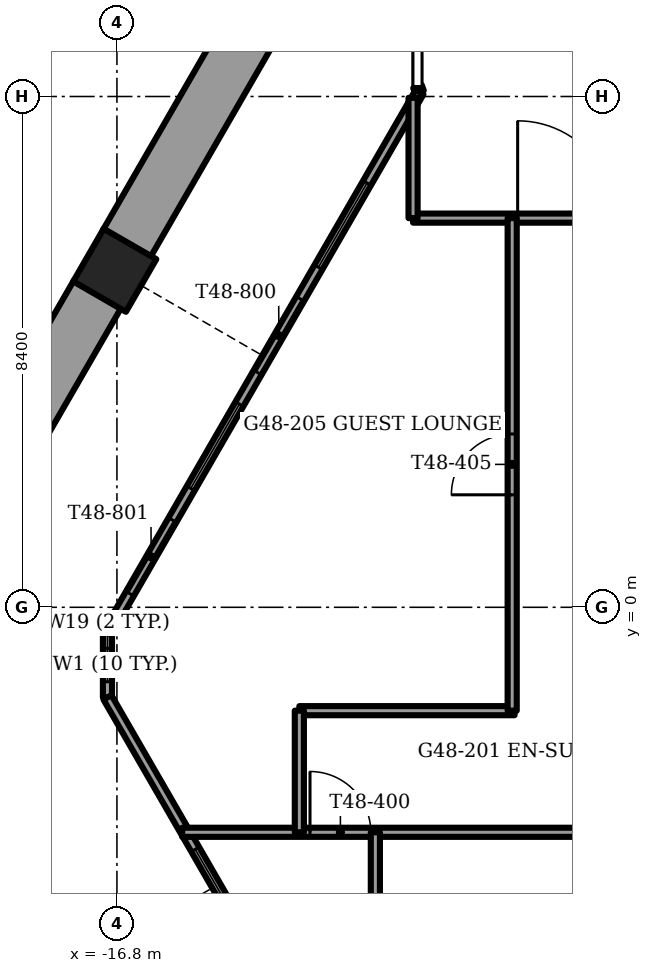
"""IFC4 building model, lengths in metres.
Left out: names, types, materials, properties, quantities, classifications, styles, units other than length and angle.
Written with IfcOpenShell. Run it as: python <this file> out.ifc"""

import sys

from ifc_helpers import new_model, si_unit, direction, frame, frame_2d, origin, origin_2d, place, context, subcontext, project, spatial, rectangle, extrude, element, fill, save


model = new_model("IFC4")
c1 = context("Model", 3, precision=1e-05, world=origin(), true_north=direction((0.0, 1.0)))
c2 = subcontext(c1, "Body", "Model", "MODEL_VIEW")
j1 = project(units=[si_unit("LENGTHUNIT", "METRE"), si_unit("PLANEANGLEUNIT", "RADIAN")], contexts=[c1])
p1 = place(None, origin())
s1 = spatial("IfcSite", under=j1, at=p1, CompositionType="ELEMENT")
p2 = place(p1, origin())
s2 = spatial("IfcBuilding", under=s1, at=p2, CompositionType="ELEMENT")
p3 = place(p2, frame((0.0, 0.0, 194.5)))
s3 = spatial("IfcBuildingStorey", under=s2, at=p3, CompositionType="ELEMENT", Elevation=194.5)
p4 = place(p3, frame((-16.835, 5.542, -1.2), z_axis=(0.0, 0.0, 1.0), x_axis=(0.5, 0.866025403784, 0.0)))
e1 = element("IfcColumn", 1, at=p4, inside=s3, PredefinedType="COLUMN", context=c2, shape_type="SweptSolid", body=[
    extrude(rectangle(XDim=1.0, YDim=1.0, at=origin_2d()), origin(), (0.0, 0.0, 1.0), 3.75),
])
p5 = place(p3, frame((-13.496, 11.427, 0.0), z_axis=(0.0, 0.0, 1.0), x_axis=(-0.499984268907, -0.866034485945, 0.0)))
e2 = element("IfcWall", 2, at=p5, inside=s3, PredefinedType="PARAPET", context=c2, shape_type="SweptSolid", body=[
    extrude(rectangle(XDim=6.296, YDim=0.9, at=frame_2d((3.148, 0.0))), origin(), (0.0, 0.0, 1.0), 1.1),
])
p6 = place(p3, frame((-17.114, 5.16, 0.0), z_axis=(0.0, 0.0, 1.0), x_axis=(-0.500022104698, -0.866012641255, 0.0)))
e3 = element("IfcWall", 3, at=p6, inside=s3, PredefinedType="PARAPET", context=c2, shape_type="SweptSolid", body=[
    extrude(rectangle(XDim=6.512, YDim=0.9, at=frame_2d((3.256, 0.0))), origin(), (0.0, 0.0, 1.0), 1.1),
])
p7 = place(p3, frame((-20.37, -1.419, 0.0), z_axis=(0.0, 0.0, 1.0), x_axis=(0.500033586455, -0.866006011767, 0.0)))
e4 = element("IfcWall", 4, at=p7, inside=s3, PredefinedType="PARAPET", context=c2, shape_type="SweptSolid", body=[
    extrude(rectangle(XDim=4.868, YDim=0.9, at=frame_2d((2.434, 0.0))), origin(), (0.0, 0.0, 1.0), 1.1),
])
p8 = place(p3, frame((-11.824, 8.472, 0.0), z_axis=(0.0, 0.0, 1.0), x_axis=(-0.499996992154, -0.866027140358, 0.0)))
e5 = element("IfcWall", 5, at=p8, inside=s3, PredefinedType="SOLIDWALL", context=c2, shape_type="SweptSolid", body=[
    extrude(rectangle(XDim=10.264, YDim=0.15, at=frame_2d((5.132, 0.0))), origin(), (0.0, 0.0, 1.0), 3.45),
])
p9 = place(p8, frame((1.725, 0.0, 0.15)))
e6 = element("IfcOpeningElement", 6, at=p9, cuts=e5, PredefinedType="OPENING", context=c2, shape_type="SweptSolid", body=[
    extrude(rectangle(XDim=1.6, YDim=2.2, at=frame_2d((0.8, 1.1))), frame((0.0, 0.075, 0.0), z_axis=(0.0, -1.0, 0.0), x_axis=(1.0, 0.0, 0.0)), (0.0, 0.0, 1.0), 0.15),
])
p10 = place(p8, frame((3.925, 0.0, 0.0)))
e7 = element("IfcOpeningElement", 7, at=p10, cuts=e5, PredefinedType="OPENING", context=c2, shape_type="SweptSolid", body=[
    extrude(rectangle(XDim=1.4, YDim=2.4, at=frame_2d((0.7, 1.2))), frame((0.0, 0.075, 0.0), z_axis=(0.0, -1.0, 0.0), x_axis=(1.0, 0.0, 0.0)), (0.0, 0.0, 1.0), 0.15),
])
p11 = place(p8, frame((5.925, 0.0, 0.15)))
e8 = element("IfcOpeningElement", 8, at=p11, cuts=e5, PredefinedType="OPENING", context=c2, shape_type="SweptSolid", body=[
    extrude(rectangle(XDim=1.6, YDim=2.2, at=frame_2d((0.8, 1.1))), frame((0.0, 0.075, 0.0), z_axis=(0.0, -1.0, 0.0), x_axis=(1.0, 0.0, 0.0)), (0.0, 0.0, 1.0), 0.15),
])
p12 = place(p8, frame((8.125, 0.0, 0.0)))
e9 = element("IfcOpeningElement", 9, at=p12, cuts=e5, PredefinedType="OPENING", context=c2, shape_type="SweptSolid", body=[
    extrude(rectangle(XDim=1.4, YDim=2.4, at=frame_2d((0.7, 1.2))), frame((0.0, 0.075, 0.0), z_axis=(0.0, -1.0, 0.0), x_axis=(1.0, 0.0, 0.0)), (0.0, 0.0, 1.0), 0.15),
])
p13 = place(p3, frame((-16.956, -1.482, 0.0), z_axis=(0.0, 0.0, 1.0), x_axis=(0.499996992154, -0.866027140358, 0.0)))
e10 = element("IfcWall", 10, at=p13, inside=s3, PredefinedType="SOLIDWALL", context=c2, shape_type="SweptSolid", body=[
    extrude(rectangle(XDim=10.264, YDim=0.15, at=frame_2d((5.132, 0.0))), origin(), (0.0, 0.0, 1.0), 3.45),
])
p14 = place(p13, frame((2.885, 0.0, 0.15)))
e11 = element("IfcOpeningElement", 11, at=p14, cuts=e10, PredefinedType="OPENING", context=c2, shape_type="SweptSolid", body=[
    extrude(rectangle(XDim=1.6, YDim=2.2, at=frame_2d((0.8, 1.1))), frame((0.0, 0.075, 0.0), z_axis=(0.0, -1.0, 0.0), x_axis=(1.0, 0.0, 0.0)), (0.0, 0.0, 1.0), 0.15),
])
p15 = place(p13, frame((5.395, 0.0, 0.15)))
e12 = element("IfcOpeningElement", 12, at=p15, cuts=e10, PredefinedType="OPENING", context=c2, shape_type="SweptSolid", body=[
    extrude(rectangle(XDim=0.9, YDim=2.2, at=frame_2d((0.45, 1.1))), frame((0.0, 0.075, 0.0), z_axis=(0.0, -1.0, 0.0), x_axis=(1.0, 0.0, 0.0)), (0.0, 0.0, 1.0), 0.15),
])
p16 = place(p13, frame((6.73, 0.0, 0.0)))
e13 = element("IfcOpeningElement", 13, at=p16, cuts=e10, PredefinedType="OPENING", context=c2, shape_type="SweptSolid", body=[
    extrude(rectangle(XDim=1.4, YDim=2.4, at=frame_2d((0.7, 1.2))), frame((0.0, 0.075, 0.0), z_axis=(0.0, -1.0, 0.0), x_axis=(1.0, 0.0, 0.0)), (0.0, 0.0, 1.0), 0.15),
])
p17 = place(p3, frame((-16.956, -0.417, 0.0), z_axis=(0.0, 0.0, 1.0), x_axis=(0.0, -1.0, 0.0)))
e14 = element("IfcWall", 14, at=p17, inside=s3, PredefinedType="SOLIDWALL", context=c2, shape_type="SweptSolid", body=[
    extrude(rectangle(XDim=1.065, YDim=0.15, at=frame_2d((0.532, 0.0))), origin(), (0.0, 0.0, 1.0), 3.45),
])
p18 = place(p17, frame((0.258, 0.0, 0.15)))
e15 = element("IfcOpeningElement", 15, at=p18, cuts=e14, PredefinedType="OPENING", context=c2, shape_type="SweptSolid", body=[
    extrude(rectangle(XDim=0.55, YDim=2.2, at=frame_2d((0.275, 1.1))), frame((0.0, 0.075, 0.0), z_axis=(0.0, -1.0, 0.0), x_axis=(1.0, 0.0, 0.0)), (0.0, 0.0, 1.0), 0.15),
])
p19 = place(p3, frame((-11.824, 8.472, 0.0), z_axis=(0.0, 0.0, 1.0), x_axis=(-0.337751931921, 0.941235163221, 0.0)))
e16 = element("IfcWall", 16, at=p19, inside=s3, PredefinedType="SOLIDWALL", context=c2, shape_type="SweptSolid", body=[
    extrude(rectangle(XDim=0.098, YDim=0.15, at=frame_2d((0.049, 0.0))), origin(), (0.0, 0.0, 1.0), 3.45),
])
p20 = place(p3, frame((-15.727, -3.7, 0.0), z_axis=(0.0, 0.0, 1.0), x_axis=(1.0, 0.0, 0.0)))
e17 = element("IfcWall", 17, at=p20, inside=s3, PredefinedType="PARTITIONING", context=c2, shape_type="SweptSolid", body=[
    extrude(rectangle(XDim=6.567, YDim=0.15, at=frame_2d((3.284, 0.0))), origin(), (0.0, 0.0, 1.0), 3.45),
])
p21 = place(p20, frame((2.102, 0.0, 0.0)))
e18 = element("IfcOpeningElement", 18, at=p21, cuts=e17, PredefinedType="OPENING", context=c2, shape_type="SweptSolid", body=[
    extrude(rectangle(XDim=1.0, YDim=2.1, at=frame_2d((0.5, 1.05))), frame((0.0, 0.075, 0.0), z_axis=(0.0, -1.0, 0.0), x_axis=(1.0, 0.0, 0.0)), (0.0, 0.0, 1.0), 0.15),
])
p22 = place(p3, frame((-13.8, -1.7, 0.0), z_axis=(0.0, 0.0, 1.0), x_axis=(1.0, 0.0, 0.0)))
e19 = element("IfcWall", 19, at=p22, inside=s3, PredefinedType="PARTITIONING", context=c2, shape_type="SweptSolid", body=[
    extrude(rectangle(XDim=3.54, YDim=0.15, at=frame_2d((1.77, 0.0))), origin(), (0.0, 0.0, 1.0), 3.45),
])
p23 = place(p3, frame((-11.93, 6.4, 0.0), z_axis=(0.0, 0.0, 1.0), x_axis=(1.0, 0.0, 0.0)))
e20 = element("IfcWall", 20, at=p23, inside=s3, PredefinedType="PARTITIONING", context=c2, shape_type="SweptSolid", body=[
    extrude(rectangle(XDim=3.42, YDim=0.15, at=frame_2d((1.71, 0.0))), origin(), (0.0, 0.0, 1.0), 3.45),
])
p24 = place(p23, frame((1.72, 0.0, 0.0)))
e21 = element("IfcOpeningElement", 21, at=p24, cuts=e20, PredefinedType="OPENING", context=c2, shape_type="SweptSolid", body=[
    extrude(rectangle(XDim=1.6, YDim=2.1, at=frame_2d((0.8, 1.05))), frame((0.0, 0.075, 0.0), z_axis=(0.0, -1.0, 0.0), x_axis=(1.0, 0.0, 0.0)), (0.0, 0.0, 1.0), 0.15),
])
p25 = place(p3, frame((-10.3, -1.7, 0.0), z_axis=(0.0, 0.0, 1.0), x_axis=(0.0, 1.0, 0.0)))
e22 = element("IfcWall", 22, at=p25, inside=s3, PredefinedType="PARTITIONING", context=c2, shape_type="SweptSolid", body=[
    extrude(rectangle(XDim=8.1, YDim=0.15, at=frame_2d((4.05, 0.0))), origin(), (0.0, 0.0, 1.0), 3.45),
])
p26 = place(p25, frame((3.55, 0.0, 0.0)))
e23 = element("IfcOpeningElement", 23, at=p26, cuts=e22, PredefinedType="OPENING", context=c2, shape_type="SweptSolid", body=[
    extrude(rectangle(XDim=1.0, YDim=2.1, at=frame_2d((0.5, 1.05))), frame((0.0, 0.075, 0.0), z_axis=(0.0, -1.0, 0.0), x_axis=(1.0, 0.0, 0.0)), (0.0, 0.0, 1.0), 0.15),
])
p27 = place(p3, frame((-11.93, 6.4, 0.0), z_axis=(0.0, 0.0, 1.0), x_axis=(0.0, 1.0, 0.0)))
e24 = element("IfcWall", 24, at=p27, inside=s3, PredefinedType="PARTITIONING", context=c2, shape_type="SweptSolid", body=[
    extrude(rectangle(XDim=1.978, YDim=0.15, at=frame_2d((0.989, 0.0))), origin(), (0.0, 0.0, 1.0), 3.45),
])
p28 = place(p3, frame((-12.55, -6.7, 0.0), z_axis=(0.0, 0.0, 1.0), x_axis=(0.0, 1.0, 0.0)))
e25 = element("IfcWall", 25, at=p28, inside=s3, PredefinedType="PARTITIONING", context=c2, shape_type="SweptSolid", body=[
    extrude(rectangle(XDim=3.0, YDim=0.15, at=frame_2d((1.5, 0.0))), origin(), (0.0, 0.0, 1.0), 3.45),
])
p29 = place(p28, frame((1.1, 0.0, 0.0)))
e26 = element("IfcOpeningElement", 26, at=p29, cuts=e25, PredefinedType="OPENING", context=c2, shape_type="SweptSolid", body=[
    extrude(rectangle(XDim=0.8, YDim=2.1, at=frame_2d((0.4, 1.05))), frame((0.0, 0.075, 0.0), z_axis=(0.0, -1.0, 0.0), x_axis=(1.0, 0.0, 0.0)), (0.0, 0.0, 1.0), 0.15),
])
p30 = place(p3, frame((-13.8, -3.7, 0.0), z_axis=(0.0, 0.0, 1.0), x_axis=(0.0, 1.0, 0.0)))
e27 = element("IfcWall", 27, at=p30, inside=s3, PredefinedType="PARTITIONING", context=c2, shape_type="SweptSolid", body=[
    extrude(rectangle(XDim=2.0, YDim=0.15, at=frame_2d((1.0, 0.0))), origin(), (0.0, 0.0, 1.0), 3.45),
])
p31 = place(p9, origin())
e28 = element("IfcWindow", 28, at=p31, inside=s3, PartitioningType="SINGLE_PANEL", PredefinedType="WINDOW", context=c2, shape_type="SweptSolid", body=[
    extrude(rectangle(XDim=1.6, YDim=2.2, at=frame_2d((0.8, 1.1))), frame((0.0, 0.03, 0.0), z_axis=(0.0, -1.0, 0.0), x_axis=(1.0, 0.0, 0.0)), (0.0, 0.0, 1.0), 0.06),
])
fill(e6, e28)
p32 = place(p10, origin())
e29 = element("IfcDoor", 29, at=p32, inside=s3, OperationType="SLIDING_TO_LEFT", PredefinedType="DOOR", context=c2, shape_type="SweptSolid", body=[
    extrude(rectangle(XDim=1.4, YDim=2.4, at=frame_2d((0.7, 1.2))), frame((0.0, 0.025, 0.0), z_axis=(0.0, -1.0, 0.0), x_axis=(1.0, 0.0, 0.0)), (0.0, 0.0, 1.0), 0.05),
])
fill(e7, e29)
p33 = place(p11, origin())
e30 = element("IfcWindow", 30, at=p33, inside=s3, PartitioningType="SINGLE_PANEL", PredefinedType="WINDOW", context=c2, shape_type="SweptSolid", body=[
    extrude(rectangle(XDim=1.6, YDim=2.2, at=frame_2d((0.8, 1.1))), frame((0.0, 0.03, 0.0), z_axis=(0.0, -1.0, 0.0), x_axis=(1.0, 0.0, 0.0)), (0.0, 0.0, 1.0), 0.06),
])
fill(e8, e30)
p34 = place(p12, origin())
e31 = element("IfcDoor", 31, at=p34, inside=s3, OperationType="SLIDING_TO_RIGHT", PredefinedType="DOOR", context=c2, shape_type="SweptSolid", body=[
    extrude(rectangle(XDim=1.4, YDim=2.4, at=frame_2d((0.7, 1.2))), frame((0.0, 0.025, 0.0), z_axis=(0.0, -1.0, 0.0), x_axis=(1.0, 0.0, 0.0)), (0.0, 0.0, 1.0), 0.05),
])
fill(e9, e31)
p35 = place(p14, origin())
e32 = element("IfcWindow", 32, at=p35, inside=s3, PartitioningType="SINGLE_PANEL", PredefinedType="WINDOW", context=c2, shape_type="SweptSolid", body=[
    extrude(rectangle(XDim=1.6, YDim=2.2, at=frame_2d((0.8, 1.1))), frame((0.0, 0.03, 0.0), z_axis=(0.0, -1.0, 0.0), x_axis=(1.0, 0.0, 0.0)), (0.0, 0.0, 1.0), 0.06),
])
fill(e11, e32)
p36 = place(p18, origin())
e33 = element("IfcWindow", 33, at=p36, inside=s3, PartitioningType="SINGLE_PANEL", PredefinedType="WINDOW", context=c2, shape_type="SweptSolid", body=[
    extrude(rectangle(XDim=0.55, YDim=2.2, at=frame_2d((0.275, 1.1))), frame((0.0, 0.03, 0.0), z_axis=(0.0, -1.0, 0.0), x_axis=(1.0, 0.0, 0.0)), (0.0, 0.0, 1.0), 0.06),
])
fill(e15, e33)
p37 = place(p21, origin())
e34 = element("IfcDoor", 34, at=p37, inside=s3, OperationType="SINGLE_SWING_LEFT", PredefinedType="DOOR", context=c2, shape_type="SweptSolid", body=[
    extrude(rectangle(XDim=1.0, YDim=2.1, at=frame_2d((0.5, 1.05))), frame((0.0, 0.025, 0.0), z_axis=(0.0, -1.0, 0.0), x_axis=(1.0, 0.0, 0.0)), (0.0, 0.0, 1.0), 0.05),
])
fill(e18, e34)
p38 = place(p26, origin())
e35 = element("IfcDoor", 35, at=p38, inside=s3, OperationType="SINGLE_SWING_LEFT", PredefinedType="DOOR", context=c2, shape_type="SweptSolid", body=[
    extrude(rectangle(XDim=1.0, YDim=2.1, at=frame_2d((0.5, 1.05))), frame((0.0, 0.025, 0.0), z_axis=(0.0, -1.0, 0.0), x_axis=(1.0, 0.0, 0.0)), (0.0, 0.0, 1.0), 0.05),
])
fill(e23, e35)
p39 = place(p24, origin())
e36 = element("IfcDoor", 36, at=p39, inside=s3, OperationType="DOUBLE_DOOR_SINGLE_SWING", PredefinedType="DOOR", context=c2, shape_type="SweptSolid", body=[
    extrude(rectangle(XDim=1.6, YDim=2.1, at=frame_2d((0.8, 1.05))), frame((0.0, 0.025, 0.0), z_axis=(0.0, -1.0, 0.0), x_axis=(1.0, 0.0, 0.0)), (0.0, 0.0, 1.0), 0.05),
])
fill(e21, e36)
save(model, sys.argv[1])
